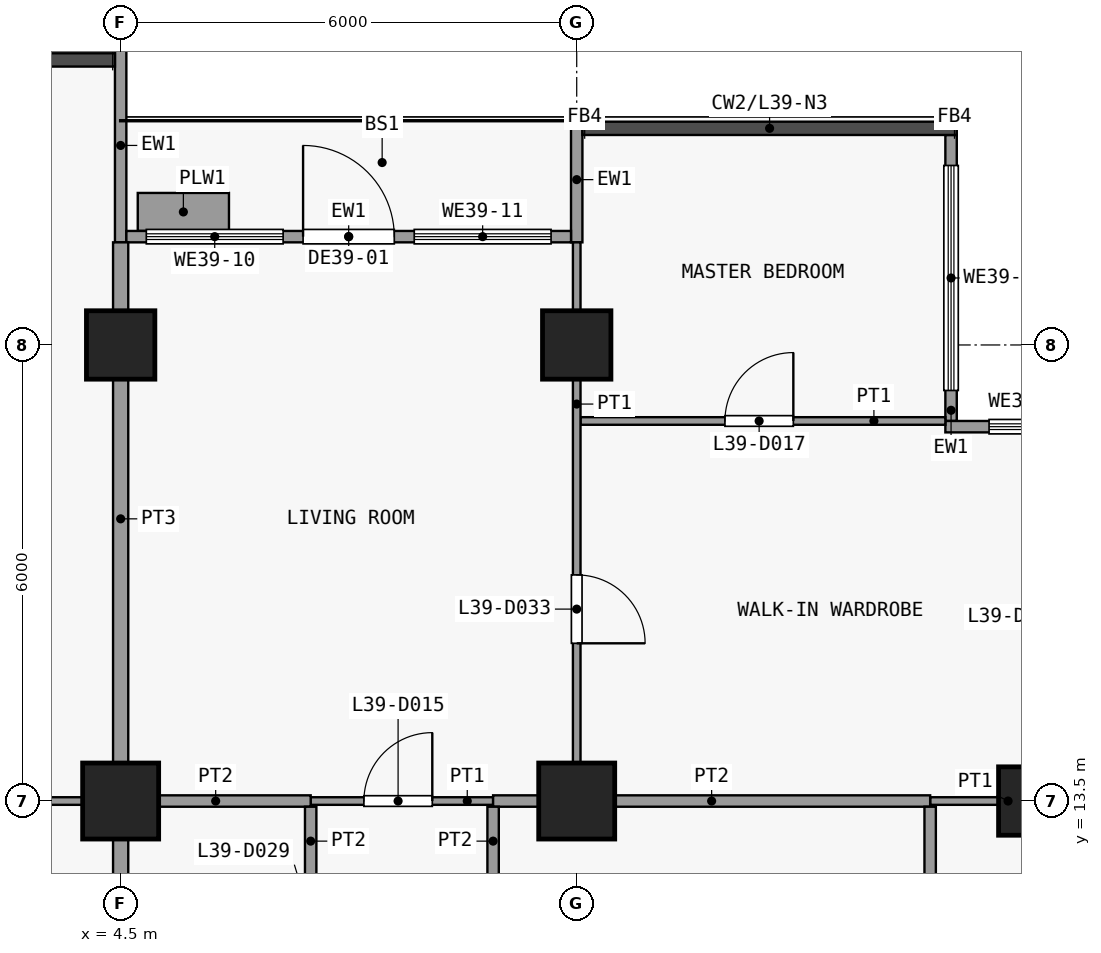
"""IFC4 building model, lengths in metres.
Left out: names, types, materials, properties, quantities, classifications, styles, units other than length and angle.
Written with IfcOpenShell. Run it as: python <this file> out.ifc"""

import sys

from ifc_helpers import new_model, si_unit, direction, frame, frame_2d, origin, origin_2d, place, context, subcontext, project, spatial, rectangle, extrude, element, fill, save


model = new_model("IFC4")
c1 = context("Model", 3, precision=1e-05, world=origin(), true_north=direction((0.0, 1.0)))
c2 = subcontext(c1, "Body", "Model", "MODEL_VIEW")
j1 = project(units=[si_unit("LENGTHUNIT", "METRE"), si_unit("PLANEANGLEUNIT", "RADIAN")], contexts=[c1])
p1 = place(None, origin())
s1 = spatial("IfcSite", under=j1, at=p1, CompositionType="ELEMENT")
p2 = place(p1, origin())
s2 = spatial("IfcBuilding", under=s1, at=p2, CompositionType="ELEMENT")
p3 = place(p2, frame((0.0, 0.0, 160.1)))
s3 = spatial("IfcBuildingStorey", under=s2, at=p3, CompositionType="ELEMENT", Elevation=160.1)
p4 = place(p3, frame((4.5, 13.5, 0.0), z_axis=(0.0, 0.0, 1.0), x_axis=(1.0, 0.0, 0.0)))
e1 = element("IfcColumn", 1, at=p4, inside=s3, PredefinedType="COLUMN", context=c2, shape_type="SweptSolid", body=[
    extrude(rectangle(XDim=1.0, YDim=1.0, at=origin_2d()), origin(), (0.0, 0.0, 1.0), 3.6),
])
p5 = place(p3, frame((4.5, 19.5, 0.0), z_axis=(0.0, 0.0, 1.0), x_axis=(1.0, 0.0, 0.0)))
e2 = element("IfcColumn", 2, at=p5, inside=s3, PredefinedType="COLUMN", context=c2, shape_type="SweptSolid", body=[
    extrude(rectangle(XDim=0.9, YDim=0.9, at=origin_2d()), origin(), (0.0, 0.0, 1.0), 3.6),
])
p6 = place(p3, frame((10.5, 13.5, 0.0), z_axis=(0.0, 0.0, 1.0), x_axis=(1.0, 0.0, 0.0)))
e3 = element("IfcColumn", 3, at=p6, inside=s3, PredefinedType="COLUMN", context=c2, shape_type="SweptSolid", body=[
    extrude(rectangle(XDim=1.0, YDim=1.0, at=origin_2d()), origin(), (0.0, 0.0, 1.0), 3.6),
])
for number, where, z_axis, x_axis in (
    (4, (10.5, 19.5, 0.0), (0.0, 0.0, 1.0), (1.0, 0.0, 0.0)),
    (5, (16.5, 13.5, 0.0), (0.0, 0.0, 1.0), (1.0, 0.0, 0.0)),
):
    element("IfcColumn", number, at=place(p3, frame(where, z_axis=z_axis, x_axis=x_axis)), inside=s3, PredefinedType="COLUMN", context=c2, shape_type="SweptSolid", body=[
        extrude(rectangle(XDim=0.9, YDim=0.9, at=origin_2d()), origin(), (0.0, 0.0, 1.0), 3.6),
    ])
p7 = place(p3, frame((15.425, 22.262, 0.0), z_axis=(0.0, 0.0, 1.0), x_axis=(0.0, -1.0, 0.0)))
e6 = element("IfcWall", 6, at=p7, inside=s3, PredefinedType="SOLIDWALL", context=c2, shape_type="SweptSolid", body=[
    extrude(rectangle(XDim=3.762, YDim=0.15, at=frame_2d((1.881, 0.0))), origin(), (0.0, 0.0, 1.0), 3.3),
])
p8 = place(p7, frame((0.401, 0.0, 0.9)))
e7 = element("IfcOpeningElement", 7, at=p8, cuts=e6, PredefinedType="OPENING", context=c2, shape_type="SweptSolid", body=[
    extrude(rectangle(XDim=2.96, YDim=2.4, at=frame_2d((1.48, 1.2))), frame((0.0, 0.085, 0.0), z_axis=(0.0, -1.0, 0.0), x_axis=(1.0, 0.0, 0.0)), (0.0, 0.0, 1.0), 0.17),
])
p9 = place(p3, frame((15.35, 18.425, 0.0), z_axis=(0.0, 0.0, 1.0), x_axis=(1.0, 0.0, 0.0)))
e8 = element("IfcWall", 8, at=p9, inside=s3, PredefinedType="SOLIDWALL", context=c2, shape_type="SweptSolid", body=[
    extrude(rectangle(XDim=4.15, YDim=0.15, at=frame_2d((2.075, 0.0))), origin(), (0.0, 0.0, 1.0), 3.3),
])
p10 = place(p9, frame((0.575, 0.0, 0.9)))
e9 = element("IfcOpeningElement", 9, at=p10, cuts=e8, PredefinedType="OPENING", context=c2, shape_type="SweptSolid", body=[
    extrude(rectangle(XDim=1.05, YDim=2.4, at=frame_2d((0.525, 1.2))), frame((0.0, 0.085, 0.0), z_axis=(0.0, -1.0, 0.0), x_axis=(1.0, 0.0, 0.0)), (0.0, 0.0, 1.0), 0.17),
])
p11 = place(p9, frame((2.075, 0.0, 0.9)))
e10 = element("IfcOpeningElement", 10, at=p11, cuts=e8, PredefinedType="OPENING", context=c2, shape_type="SweptSolid", body=[
    extrude(rectangle(XDim=1.5, YDim=2.4, at=frame_2d((0.75, 1.2))), frame((0.0, 0.085, 0.0), z_axis=(0.0, -1.0, 0.0), x_axis=(1.0, 0.0, 0.0)), (0.0, 0.0, 1.0), 0.17),
])
p12 = place(p3, frame((4.5, 20.85, 0.0), z_axis=(0.0, 0.0, 1.0), x_axis=(0.0, 1.0, 0.0)))
e11 = element("IfcWall", 11, at=p12, inside=s3, PredefinedType="SOLIDWALL", context=c2, shape_type="SweptSolid", body=[
    extrude(rectangle(XDim=2.55, YDim=0.15, at=frame_2d((1.275, 0.0))), origin(), (0.0, 0.0, 1.0), 3.3),
])
p13 = place(p3, frame((10.5, 20.85, 0.0), z_axis=(0.0, 0.0, 1.0), x_axis=(0.0, 1.0, 0.0)))
e12 = element("IfcWall", 12, at=p13, inside=s3, PredefinedType="SOLIDWALL", context=c2, shape_type="SweptSolid", body=[
    extrude(rectangle(XDim=1.65, YDim=0.15, at=frame_2d((0.825, 0.0))), origin(), (0.0, 0.0, 1.0), 3.3),
])
p14 = place(p3, frame((4.575, 20.925, 0.0), z_axis=(0.0, 0.0, 1.0), x_axis=(1.0, 0.0, 0.0)))
e13 = element("IfcWall", 13, at=p14, inside=s3, PredefinedType="SOLIDWALL", context=c2, shape_type="SweptSolid", body=[
    extrude(rectangle(XDim=5.85, YDim=0.15, at=frame_2d((2.925, 0.0))), origin(), (0.0, 0.0, 1.0), 3.3),
])
p15 = place(p14, frame((2.325, 0.0, 0.0)))
e14 = element("IfcOpeningElement", 14, at=p15, cuts=e13, PredefinedType="OPENING", context=c2, shape_type="SweptSolid", body=[
    extrude(rectangle(XDim=1.2, YDim=2.4, at=frame_2d((0.6, 1.2))), frame((0.0, 0.085, 0.0), z_axis=(0.0, -1.0, 0.0), x_axis=(1.0, 0.0, 0.0)), (0.0, 0.0, 1.0), 0.17),
])
p16 = place(p14, frame((0.262, 0.0, 0.9)))
e15 = element("IfcOpeningElement", 15, at=p16, cuts=e13, PredefinedType="OPENING", context=c2, shape_type="SweptSolid", body=[
    extrude(rectangle(XDim=1.8, YDim=2.1, at=frame_2d((0.9, 1.05))), frame((0.0, 0.085, 0.0), z_axis=(0.0, -1.0, 0.0), x_axis=(1.0, 0.0, 0.0)), (0.0, 0.0, 1.0), 0.17),
])
p17 = place(p14, frame((3.788, 0.0, 0.9)))
e16 = element("IfcOpeningElement", 16, at=p17, cuts=e13, PredefinedType="OPENING", context=c2, shape_type="SweptSolid", body=[
    extrude(rectangle(XDim=1.8, YDim=2.1, at=frame_2d((0.9, 1.05))), frame((0.0, 0.085, 0.0), z_axis=(0.0, -1.0, 0.0), x_axis=(1.0, 0.0, 0.0)), (0.0, 0.0, 1.0), 0.17),
])
p18 = place(p3, frame((4.725, 21.25, 0.0), z_axis=(0.0, 0.0, 1.0), x_axis=(1.0, 0.0, 0.0)))
e17 = element("IfcWall", 17, at=p18, inside=s3, PredefinedType="USERDEFINED", context=c2, shape_type="SweptSolid", body=[
    extrude(rectangle(XDim=1.2, YDim=0.5, at=frame_2d((0.6, 0.0))), origin(), (0.0, 0.0, 1.0), 0.9),
])
p19 = place(p3, frame((-3.1, 13.5, 0.0), z_axis=(0.0, 0.0, 1.0), x_axis=(1.0, 0.0, 0.0)))
e18 = element("IfcWall", 18, at=p19, inside=s3, PredefinedType="PARTITIONING", context=c2, shape_type="SweptSolid", body=[
    extrude(rectangle(XDim=7.6, YDim=0.1, at=frame_2d((3.8, 0.0))), origin(), (0.0, 0.0, 1.0), 3.3),
])
p20 = place(p3, frame((7.0, 13.5, 0.0), z_axis=(0.0, 0.0, 1.0), x_axis=(1.0, 0.0, 0.0)))
e19 = element("IfcWall", 19, at=p20, inside=s3, PredefinedType="PARTITIONING", context=c2, shape_type="SweptSolid", body=[
    extrude(rectangle(XDim=2.4, YDim=0.1, at=frame_2d((1.2, 0.0))), origin(), (0.0, 0.0, 1.0), 3.3),
])
p21 = place(p20, frame((0.7, 0.0, 0.0)))
e20 = element("IfcOpeningElement", 20, at=p21, cuts=e19, PredefinedType="OPENING", context=c2, shape_type="SweptSolid", body=[
    extrude(rectangle(XDim=0.9, YDim=2.1, at=frame_2d((0.45, 1.05))), frame((0.0, 0.06, 0.0), z_axis=(0.0, -1.0, 0.0), x_axis=(1.0, 0.0, 0.0)), (0.0, 0.0, 1.0), 0.12),
])
p22 = place(p3, frame((15.15, 13.5, 0.0), z_axis=(0.0, 0.0, 1.0), x_axis=(1.0, 0.0, 0.0)))
e21 = element("IfcWall", 21, at=p22, inside=s3, PredefinedType="PARTITIONING", context=c2, shape_type="SweptSolid", body=[
    extrude(rectangle(XDim=2.05, YDim=0.1, at=frame_2d((1.025, 0.0))), origin(), (0.0, 0.0, 1.0), 3.3),
])
p23 = place(p3, frame((4.5, 13.5, 0.0), z_axis=(0.0, 0.0, 1.0), x_axis=(1.0, 0.0, 0.0)))
e22 = element("IfcWall", 22, at=p23, inside=s3, PredefinedType="PARTITIONING", context=c2, shape_type="SweptSolid", body=[
    extrude(rectangle(XDim=2.5, YDim=0.15, at=frame_2d((1.25, 0.0))), origin(), (0.0, 0.0, 1.0), 3.3),
])
p24 = place(p3, frame((9.4, 13.5, 0.0), z_axis=(0.0, 0.0, 1.0), x_axis=(1.0, 0.0, 0.0)))
e23 = element("IfcWall", 23, at=p24, inside=s3, PredefinedType="PARTITIONING", context=c2, shape_type="SweptSolid", body=[
    extrude(rectangle(XDim=5.75, YDim=0.15, at=frame_2d((2.875, 0.0))), origin(), (0.0, 0.0, 1.0), 3.3),
])
p25 = place(p3, frame((10.55, 18.5, 0.0), z_axis=(0.0, 0.0, 1.0), x_axis=(1.0, 0.0, 0.0)))
e24 = element("IfcWall", 24, at=p25, inside=s3, PredefinedType="PARTITIONING", context=c2, shape_type="SweptSolid", body=[
    extrude(rectangle(XDim=4.8, YDim=0.1, at=frame_2d((2.4, 0.0))), origin(), (0.0, 0.0, 1.0), 3.3),
])
p26 = place(p25, frame((1.9, 0.0, 0.0)))
e25 = element("IfcOpeningElement", 25, at=p26, cuts=e24, PredefinedType="OPENING", context=c2, shape_type="SweptSolid", body=[
    extrude(rectangle(XDim=0.9, YDim=2.1, at=frame_2d((0.45, 1.05))), frame((0.0, 0.06, 0.0), z_axis=(0.0, -1.0, 0.0), x_axis=(1.0, 0.0, 0.0)), (0.0, 0.0, 1.0), 0.12),
])
p27 = place(p3, frame((4.5, 10.6, 0.0), z_axis=(0.0, 0.0, 1.0), x_axis=(0.0, 1.0, 0.0)))
e26 = element("IfcWall", 26, at=p27, inside=s3, PredefinedType="PARTITIONING", context=c2, shape_type="SweptSolid", body=[
    extrude(rectangle(XDim=2.825, YDim=0.2, at=frame_2d((1.413, 0.0))), origin(), (0.0, 0.0, 1.0), 3.3),
])
p28 = place(p3, frame((4.5, 13.575, 0.0), z_axis=(0.0, 0.0, 1.0), x_axis=(0.0, 1.0, 0.0)))
e27 = element("IfcWall", 27, at=p28, inside=s3, PredefinedType="PARTITIONING", context=c2, shape_type="SweptSolid", body=[
    extrude(rectangle(XDim=7.275, YDim=0.2, at=frame_2d((3.638, 0.0))), origin(), (0.0, 0.0, 1.0), 3.3),
])
p29 = place(p3, frame((7.0, 10.6, 0.0), z_axis=(0.0, 0.0, 1.0), x_axis=(0.0, 1.0, 0.0)))
e28 = element("IfcWall", 28, at=p29, inside=s3, PredefinedType="PARTITIONING", context=c2, shape_type="SweptSolid", body=[
    extrude(rectangle(XDim=2.825, YDim=0.15, at=frame_2d((1.413, 0.0))), origin(), (0.0, 0.0, 1.0), 3.3),
])
p30 = place(p29, frame((0.9, 0.0, 0.0)))
e29 = element("IfcOpeningElement", 29, at=p30, cuts=e28, PredefinedType="OPENING", context=c2, shape_type="SweptSolid", body=[
    extrude(rectangle(XDim=0.9, YDim=2.1, at=frame_2d((0.45, 1.05))), frame((0.0, 0.085, 0.0), z_axis=(0.0, -1.0, 0.0), x_axis=(1.0, 0.0, 0.0)), (0.0, 0.0, 1.0), 0.17),
])
p31 = place(p3, frame((9.4, 10.6, 0.0), z_axis=(0.0, 0.0, 1.0), x_axis=(0.0, 1.0, 0.0)))
e30 = element("IfcWall", 30, at=p31, inside=s3, PredefinedType="PARTITIONING", context=c2, shape_type="SweptSolid", body=[
    extrude(rectangle(XDim=2.825, YDim=0.15, at=frame_2d((1.413, 0.0))), origin(), (0.0, 0.0, 1.0), 3.3),
])
p32 = place(p31, frame((0.9, 0.0, 0.0)))
e31 = element("IfcOpeningElement", 31, at=p32, cuts=e30, PredefinedType="OPENING", context=c2, shape_type="SweptSolid", body=[
    extrude(rectangle(XDim=0.9, YDim=2.1, at=frame_2d((0.45, 1.05))), frame((0.0, 0.085, 0.0), z_axis=(0.0, -1.0, 0.0), x_axis=(1.0, 0.0, 0.0)), (0.0, 0.0, 1.0), 0.17),
])
p33 = place(p3, frame((10.5, 13.575, 0.0), z_axis=(0.0, 0.0, 1.0), x_axis=(0.0, 1.0, 0.0)))
e32 = element("IfcWall", 32, at=p33, inside=s3, PredefinedType="PARTITIONING", context=c2, shape_type="SweptSolid", body=[
    extrude(rectangle(XDim=7.275, YDim=0.1, at=frame_2d((3.638, 0.0))), origin(), (0.0, 0.0, 1.0), 3.3),
])
p34 = place(p33, frame((2.0, 0.0, 0.0)))
e33 = element("IfcOpeningElement", 33, at=p34, cuts=e32, PredefinedType="OPENING", context=c2, shape_type="SweptSolid", body=[
    extrude(rectangle(XDim=0.9, YDim=2.1, at=frame_2d((0.45, 1.05))), frame((0.0, 0.06, 0.0), z_axis=(0.0, -1.0, 0.0), x_axis=(1.0, 0.0, 0.0)), (0.0, 0.0, 1.0), 0.12),
])
p35 = place(p3, frame((15.15, 10.6, 0.0), z_axis=(0.0, 0.0, 1.0), x_axis=(0.0, 1.0, 0.0)))
e34 = element("IfcWall", 34, at=p35, inside=s3, PredefinedType="PARTITIONING", context=c2, shape_type="SweptSolid", body=[
    extrude(rectangle(XDim=2.825, YDim=0.15, at=frame_2d((1.413, 0.0))), origin(), (0.0, 0.0, 1.0), 3.3),
])
p36 = place(p35, frame((1.0, 0.0, 0.0)))
e35 = element("IfcOpeningElement", 35, at=p36, cuts=e34, PredefinedType="OPENING", context=c2, shape_type="SweptSolid", body=[
    extrude(rectangle(XDim=0.9, YDim=2.1, at=frame_2d((0.45, 1.05))), frame((0.0, 0.085, 0.0), z_axis=(0.0, -1.0, 0.0), x_axis=(1.0, 0.0, 0.0)), (0.0, 0.0, 1.0), 0.17),
])
p37 = place(p8, origin())
e36 = element("IfcWindow", 36, at=p37, inside=s3, PartitioningType="SINGLE_PANEL", PredefinedType="WINDOW", context=c2, shape_type="SweptSolid", body=[
    extrude(rectangle(XDim=2.96, YDim=2.4, at=frame_2d((1.48, 1.2))), frame((0.0, 0.03, 0.0), z_axis=(0.0, -1.0, 0.0), x_axis=(1.0, 0.0, 0.0)), (0.0, 0.0, 1.0), 0.06),
])
fill(e7, e36)
p38 = place(p10, origin())
e37 = element("IfcWindow", 37, at=p38, inside=s3, PartitioningType="SINGLE_PANEL", PredefinedType="WINDOW", context=c2, shape_type="SweptSolid", body=[
    extrude(rectangle(XDim=1.05, YDim=2.4, at=frame_2d((0.525, 1.2))), frame((0.0, 0.03, 0.0), z_axis=(0.0, -1.0, 0.0), x_axis=(1.0, 0.0, 0.0)), (0.0, 0.0, 1.0), 0.06),
])
fill(e9, e37)
p39 = place(p15, origin())
e38 = element("IfcDoor", 38, at=p39, inside=s3, OperationType="SINGLE_SWING_LEFT", PredefinedType="DOOR", context=c2, shape_type="SweptSolid", body=[
    extrude(rectangle(XDim=1.2, YDim=2.4, at=frame_2d((0.6, 1.2))), frame((0.0, 0.025, 0.0), z_axis=(0.0, -1.0, 0.0), x_axis=(1.0, 0.0, 0.0)), (0.0, 0.0, 1.0), 0.05),
])
fill(e14, e38)
p40 = place(p16, origin())
e39 = element("IfcWindow", 39, at=p40, inside=s3, PartitioningType="SINGLE_PANEL", PredefinedType="WINDOW", context=c2, shape_type="SweptSolid", body=[
    extrude(rectangle(XDim=1.8, YDim=2.1, at=frame_2d((0.9, 1.05))), frame((0.0, 0.03, 0.0), z_axis=(0.0, -1.0, 0.0), x_axis=(1.0, 0.0, 0.0)), (0.0, 0.0, 1.0), 0.06),
])
fill(e15, e39)
p41 = place(p17, origin())
e40 = element("IfcWindow", 40, at=p41, inside=s3, PartitioningType="SINGLE_PANEL", PredefinedType="WINDOW", context=c2, shape_type="SweptSolid", body=[
    extrude(rectangle(XDim=1.8, YDim=2.1, at=frame_2d((0.9, 1.05))), frame((0.0, 0.03, 0.0), z_axis=(0.0, -1.0, 0.0), x_axis=(1.0, 0.0, 0.0)), (0.0, 0.0, 1.0), 0.06),
])
fill(e16, e40)
p42 = place(p21, origin())
e41 = element("IfcDoor", 41, at=p42, inside=s3, OperationType="SINGLE_SWING_LEFT", PredefinedType="DOOR", context=c2, shape_type="SweptSolid", body=[
    extrude(rectangle(XDim=0.9, YDim=2.1, at=frame_2d((0.45, 1.05))), frame((0.0, 0.025, 0.0), z_axis=(0.0, -1.0, 0.0), x_axis=(1.0, 0.0, 0.0)), (0.0, 0.0, 1.0), 0.05),
])
fill(e20, e41)
p43 = place(p26, origin())
e42 = element("IfcDoor", 42, at=p43, inside=s3, OperationType="SINGLE_SWING_LEFT", PredefinedType="DOOR", context=c2, shape_type="SweptSolid", body=[
    extrude(rectangle(XDim=0.9, YDim=2.1, at=frame_2d((0.45, 1.05))), frame((0.0, 0.025, 0.0), z_axis=(0.0, -1.0, 0.0), x_axis=(1.0, 0.0, 0.0)), (0.0, 0.0, 1.0), 0.05),
])
fill(e25, e42)
p44 = place(p34, origin())
e43 = element("IfcDoor", 43, at=p44, inside=s3, OperationType="SINGLE_SWING_LEFT", PredefinedType="DOOR", context=c2, shape_type="SweptSolid", body=[
    extrude(rectangle(XDim=0.9, YDim=2.1, at=frame_2d((0.45, 1.05))), frame((0.0, 0.025, 0.0), z_axis=(0.0, -1.0, 0.0), x_axis=(1.0, 0.0, 0.0)), (0.0, 0.0, 1.0), 0.05),
])
fill(e33, e43)
save(model, sys.argv[1])
